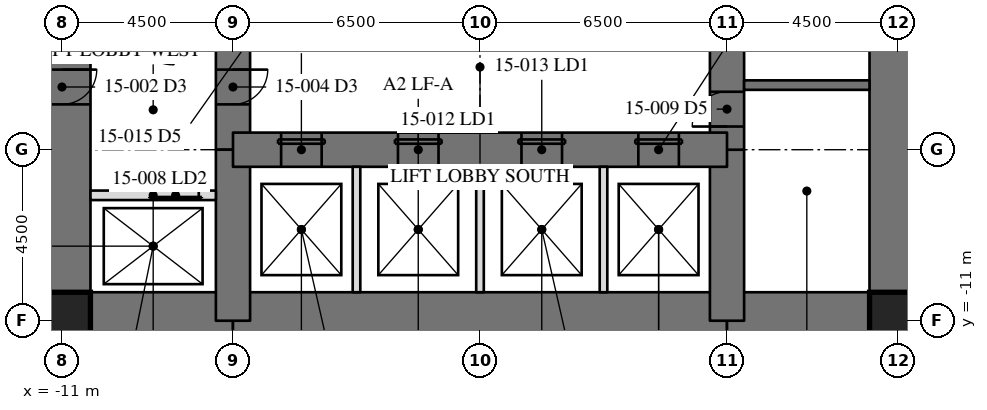
"""IFC4 building model, lengths in metres.
Left out: names, types, materials, properties, quantities, classifications, styles, units other than length and angle.
Written with IfcOpenShell. Run it as: python <this file> out.ifc"""

import sys

from ifc_helpers import new_model, si_unit, direction, frame, frame_2d, origin, origin_2d, place, context, subcontext, project, spatial, rectangle, hollow_rectangle, extrude, element, fill, save


model = new_model("IFC4")
c1 = context("Model", 3, precision=1e-05, world=origin(), true_north=direction((0.0, 1.0)))
c2 = subcontext(c1, "Body", "Model", "MODEL_VIEW")
j1 = project(units=[si_unit("LENGTHUNIT", "METRE"), si_unit("PLANEANGLEUNIT", "RADIAN")], contexts=[c1])
p1 = place(None, origin())
s1 = spatial("IfcSite", under=j1, at=p1, CompositionType="ELEMENT")
p2 = place(p1, origin())
s2 = spatial("IfcBuilding", under=s1, at=p2, CompositionType="ELEMENT")
p3 = place(p2, frame((0.0, 0.0, 65.2)))
s3 = spatial("IfcBuildingStorey", under=s2, at=p3, CompositionType="ELEMENT", Elevation=65.2)
p4 = place(p3, frame((11.0, -11.0, 0.0), z_axis=(0.0, 0.0, 1.0), x_axis=(0.0, 1.0, 0.0)))
e1 = element("IfcWall", 1, at=p4, inside=s3, PredefinedType="SHEAR", context=c2, shape_type="SweptSolid", body=[
    extrude(rectangle(XDim=22.0, YDim=1.5, at=frame_2d((11.0, 0.0))), origin(), (0.0, 0.0, 1.0), 4.1),
])
p5 = place(p4, frame((15.393, 0.0, 0.0)))
e2 = element("IfcOpeningElement", 2, at=p5, cuts=e1, PredefinedType="OPENING", context=c2, shape_type="SweptSolid", body=[
    extrude(rectangle(XDim=0.915, YDim=2.134, at=frame_2d((0.458, 1.067))), frame((0.0, 0.76, 0.0), z_axis=(0.0, -1.0, 0.0), x_axis=(1.0, 0.0, 0.0)), (0.0, 0.0, 1.0), 1.52),
])
p6 = place(p3, frame((-11.0, 11.0, 0.0), z_axis=(0.0, 0.0, 1.0), x_axis=(0.0, -1.0, 0.0)))
e3 = element("IfcWall", 3, at=p6, inside=s3, PredefinedType="SHEAR", context=c2, shape_type="SweptSolid", body=[
    extrude(rectangle(XDim=22.0, YDim=1.5, at=frame_2d((11.0, 0.0))), origin(), (0.0, 0.0, 1.0), 4.1),
])
p7 = place(p6, frame((15.393, 0.0, 0.0)))
e4 = element("IfcOpeningElement", 4, at=p7, cuts=e3, PredefinedType="OPENING", context=c2, shape_type="SweptSolid", body=[
    extrude(rectangle(XDim=0.915, YDim=2.134, at=frame_2d((0.458, 1.067))), frame((0.0, 0.76, 0.0), z_axis=(0.0, -1.0, 0.0), x_axis=(1.0, 0.0, 0.0)), (0.0, 0.0, 1.0), 1.52),
])
p8 = place(p3, frame((-11.0, -11.0, 0.0), z_axis=(0.0, 0.0, 1.0), x_axis=(1.0, 0.0, 0.0)))
e5 = element("IfcWall", 5, at=p8, inside=s3, PredefinedType="SHEAR", context=c2, shape_type="SweptSolid", body=[
    extrude(rectangle(XDim=4.5, YDim=1.5, at=frame_2d((2.25, 0.0))), origin(), (0.0, 0.0, 1.0), 4.1),
])
p9 = place(p3, frame((-6.5, -11.0, 0.0), z_axis=(0.0, 0.0, 1.0), x_axis=(1.0, 0.0, 0.0)))
e6 = element("IfcWall", 6, at=p9, inside=s3, PredefinedType="SHEAR", context=c2, shape_type="SweptSolid", body=[
    extrude(rectangle(XDim=13.0, YDim=1.5, at=frame_2d((6.5, 0.0))), origin(), (0.0, 0.0, 1.0), 4.1),
])
p10 = place(p3, frame((6.5, -11.0, 0.0), z_axis=(0.0, 0.0, 1.0), x_axis=(1.0, 0.0, 0.0)))
e7 = element("IfcWall", 7, at=p10, inside=s3, PredefinedType="SHEAR", context=c2, shape_type="SweptSolid", body=[
    extrude(rectangle(XDim=4.5, YDim=1.5, at=frame_2d((2.25, 0.0))), origin(), (0.0, 0.0, 1.0), 4.1),
])
p11 = place(p3, frame((6.5, -11.0, 0.0), z_axis=(0.0, 0.0, 1.0), x_axis=(0.0, 1.0, 0.0)))
e8 = element("IfcWall", 8, at=p11, inside=s3, PredefinedType="SHEAR", context=c2, shape_type="SweptSolid", body=[
    extrude(rectangle(XDim=4.5, YDim=0.9, at=frame_2d((2.25, 0.0))), origin(), (0.0, 0.0, 1.0), 4.1),
])
p12 = place(p3, frame((6.5, -6.5, 0.0), z_axis=(0.0, 0.0, 1.0), x_axis=(0.0, 1.0, 0.0)))
e9 = element("IfcWall", 9, at=p12, inside=s3, PredefinedType="SHEAR", context=c2, shape_type="SweptSolid", body=[
    extrude(rectangle(XDim=13.0, YDim=0.9, at=frame_2d((6.5, 0.0))), origin(), (0.0, 0.0, 1.0), 4.1),
])
p13 = place(p12, frame((10.893, 0.0, 0.0)))
e10 = element("IfcOpeningElement", 10, at=p13, cuts=e9, PredefinedType="OPENING", context=c2, shape_type="SweptSolid", body=[
    extrude(rectangle(XDim=0.915, YDim=2.134, at=frame_2d((0.458, 1.067))), frame((0.0, 0.46, 0.0), z_axis=(0.0, -1.0, 0.0), x_axis=(1.0, 0.0, 0.0)), (0.0, 0.0, 1.0), 0.92),
])
p14 = place(p12, frame((0.61, 0.0, 0.0)))
e11 = element("IfcOpeningElement", 11, at=p14, cuts=e9, PredefinedType="OPENING", context=c2, shape_type="SweptSolid", body=[
    extrude(rectangle(XDim=0.915, YDim=2.134, at=frame_2d((0.458, 1.067))), frame((0.0, 0.46, 0.0), z_axis=(0.0, -1.0, 0.0), x_axis=(1.0, 0.0, 0.0)), (0.0, 0.0, 1.0), 0.92),
])
p15 = place(p3, frame((-6.5, 6.5, 0.0), z_axis=(0.0, 0.0, 1.0), x_axis=(0.0, -1.0, 0.0)))
e12 = element("IfcWall", 12, at=p15, inside=s3, PredefinedType="SHEAR", context=c2, shape_type="SweptSolid", body=[
    extrude(rectangle(XDim=13.0, YDim=0.9, at=frame_2d((6.5, 0.0))), origin(), (0.0, 0.0, 1.0), 4.1),
])
p16 = place(p15, frame((10.893, 0.0, 0.0)))
e13 = element("IfcOpeningElement", 13, at=p16, cuts=e12, PredefinedType="OPENING", context=c2, shape_type="SweptSolid", body=[
    extrude(rectangle(XDim=0.915, YDim=2.134, at=frame_2d((0.458, 1.067))), frame((0.0, 0.46, 0.0), z_axis=(0.0, -1.0, 0.0), x_axis=(1.0, 0.0, 0.0)), (0.0, 0.0, 1.0), 0.92),
])
p17 = place(p15, frame((0.61, 0.0, 0.0)))
e14 = element("IfcOpeningElement", 14, at=p17, cuts=e12, PredefinedType="OPENING", context=c2, shape_type="SweptSolid", body=[
    extrude(rectangle(XDim=0.915, YDim=2.134, at=frame_2d((0.458, 1.067))), frame((0.0, 0.46, 0.0), z_axis=(0.0, -1.0, 0.0), x_axis=(1.0, 0.0, 0.0)), (0.0, 0.0, 1.0), 0.92),
])
p18 = place(p3, frame((-6.5, -6.5, 0.0), z_axis=(0.0, 0.0, 1.0), x_axis=(0.0, -1.0, 0.0)))
e15 = element("IfcWall", 15, at=p18, inside=s3, PredefinedType="SHEAR", context=c2, shape_type="SweptSolid", body=[
    extrude(rectangle(XDim=4.5, YDim=0.9, at=frame_2d((2.25, 0.0))), origin(), (0.0, 0.0, 1.0), 4.1),
])
p19 = place(p3, frame((-6.5, -6.5, 0.0), z_axis=(0.0, 0.0, 1.0), x_axis=(1.0, 0.0, 0.0)))
e16 = element("IfcWall", 16, at=p19, inside=s3, PredefinedType="SHEAR", context=c2, shape_type="SweptSolid", body=[
    extrude(rectangle(XDim=13.0, YDim=0.9, at=frame_2d((6.5, 0.0))), origin(), (0.0, 0.0, 1.0), 4.1),
])
p20 = place(p19, frame((1.267, 0.0, 0.0)))
e17 = element("IfcOpeningElement", 17, at=p20, cuts=e16, PredefinedType="OPENING", context=c2, shape_type="SweptSolid", body=[
    extrude(rectangle(XDim=1.067, YDim=2.134, at=frame_2d((0.533, 1.067))), frame((0.0, 0.46, 0.0), z_axis=(0.0, -1.0, 0.0), x_axis=(1.0, 0.0, 0.0)), (0.0, 0.0, 1.0), 0.92),
])
p21 = place(p19, frame((4.342, 0.0, 0.0)))
e18 = element("IfcOpeningElement", 18, at=p21, cuts=e16, PredefinedType="OPENING", context=c2, shape_type="SweptSolid", body=[
    extrude(rectangle(XDim=1.067, YDim=2.134, at=frame_2d((0.533, 1.067))), frame((0.0, 0.46, 0.0), z_axis=(0.0, -1.0, 0.0), x_axis=(1.0, 0.0, 0.0)), (0.0, 0.0, 1.0), 0.92),
])
p22 = place(p19, frame((7.592, 0.0, 0.0)))
e19 = element("IfcOpeningElement", 19, at=p22, cuts=e16, PredefinedType="OPENING", context=c2, shape_type="SweptSolid", body=[
    extrude(rectangle(XDim=1.067, YDim=2.134, at=frame_2d((0.533, 1.067))), frame((0.0, 0.46, 0.0), z_axis=(0.0, -1.0, 0.0), x_axis=(1.0, 0.0, 0.0)), (0.0, 0.0, 1.0), 0.92),
])
p23 = place(p19, frame((10.667, 0.0, 0.0)))
e20 = element("IfcOpeningElement", 20, at=p23, cuts=e16, PredefinedType="OPENING", context=c2, shape_type="SweptSolid", body=[
    extrude(rectangle(XDim=1.067, YDim=2.134, at=frame_2d((0.533, 1.067))), frame((0.0, 0.46, 0.0), z_axis=(0.0, -1.0, 0.0), x_axis=(1.0, 0.0, 0.0)), (0.0, 0.0, 1.0), 0.92),
])
for number, where, z_axis, x_axis in (
    (21, (-11.0, -11.0, 0.0), (0.0, 0.0, 1.0), (1.0, 0.0, 0.0)),
    (22, (11.0, -11.0, 0.0), (0.0, 0.0, 1.0), (1.0, 0.0, 0.0)),
):
    element("IfcColumn", number, at=place(p3, frame(where, z_axis=z_axis, x_axis=x_axis)), inside=s3, PredefinedType="COLUMN", context=c2, shape_type="SweptSolid", body=[
        extrude(hollow_rectangle(XDim=1.499, YDim=1.499, WallThickness=0.102, at=origin_2d()), origin(), (0.0, 0.0, 1.0), 4.1),
    ])
p24 = place(p3, frame((6.95, -4.8, 0.0), z_axis=(0.0, 0.0, 1.0), x_axis=(1.0, 0.0, 0.0)))
e23 = element("IfcWall", 23, at=p24, inside=s3, PredefinedType="SOLIDWALL", context=c2, shape_type="SweptSolid", body=[
    extrude(rectangle(XDim=3.3, YDim=0.25, at=frame_2d((1.65, 0.0))), origin(), (0.0, 0.0, 1.0), 3.91),
])
p25 = place(p3, frame((-6.95, -7.7, 0.0), z_axis=(0.0, 0.0, 1.0), x_axis=(-1.0, 0.0, 0.0)))
e24 = element("IfcWall", 24, at=p25, inside=s3, PredefinedType="PARTITIONING", context=c2, shape_type="SweptSolid", body=[
    extrude(rectangle(XDim=3.3, YDim=0.25, at=frame_2d((1.65, 0.0))), origin(), (0.0, 0.0, 1.0), 3.91),
])
p26 = place(p25, frame((0.45, 0.0, 0.0)))
e25 = element("IfcOpeningElement", 25, at=p26, cuts=e24, PredefinedType="OPENING", context=c2, shape_type="SweptSolid", body=[
    extrude(rectangle(XDim=1.219, YDim=2.134, at=frame_2d((0.609, 1.067))), frame((0.0, 0.135, 0.0), z_axis=(0.0, -1.0, 0.0), x_axis=(1.0, 0.0, 0.0)), (0.0, 0.0, 1.0), 0.27),
])
for number, where, z_axis, x_axis in (
    (26, (-3.25, -10.25, 0.0), (0.0, 0.0, 1.0), (0.0, 1.0, 0.0)),
    (27, (0.0, -10.25, 0.0), (0.0, 0.0, 1.0), (0.0, 1.0, 0.0)),
    (28, (3.25, -10.25, 0.0), (0.0, 0.0, 1.0), (0.0, 1.0, 0.0)),
):
    element("IfcWall", number, at=place(p3, frame(where, z_axis=z_axis, x_axis=x_axis)), inside=s3, PredefinedType="PARTITIONING", context=c2, shape_type="SweptSolid", body=[
        extrude(rectangle(XDim=3.3, YDim=0.2, at=frame_2d((1.65, 0.0))), origin(), (0.0, 0.0, 1.0), 3.91),
    ])
p27 = place(p16, origin())
e29 = element("IfcDoor", 29, at=p27, inside=s3, OperationType="SINGLE_SWING_RIGHT", PredefinedType="DOOR", context=c2, shape_type="SweptSolid", body=[
    extrude(rectangle(XDim=0.915, YDim=2.134, at=frame_2d((0.458, 1.067))), frame((0.0, -0.375, 0.0), z_axis=(0.0, -1.0, 0.0), x_axis=(1.0, 0.0, 0.0)), (0.0, 0.0, 1.0), 0.05),
])
fill(e13, e29)
p28 = place(p26, origin())
e30 = element("IfcDoor", 30, at=p28, inside=s3, OperationType="SLIDING_TO_LEFT", PredefinedType="DOOR", context=c2, shape_type="SweptSolid", body=[
    extrude(rectangle(XDim=1.219, YDim=2.134, at=frame_2d((0.609, 1.067))), frame((0.0, 0.025, 0.0), z_axis=(0.0, -1.0, 0.0), x_axis=(1.0, 0.0, 0.0)), (0.0, 0.0, 1.0), 0.05),
])
fill(e25, e30)
p29 = place(p14, origin())
e31 = element("IfcDoor", 31, at=p29, inside=s3, OperationType="SINGLE_SWING_RIGHT", PredefinedType="DOOR", context=c2, shape_type="SweptSolid", body=[
    extrude(rectangle(XDim=0.915, YDim=2.134, at=frame_2d((0.458, 1.067))), frame((0.0, -0.375, 0.0), z_axis=(0.0, -1.0, 0.0), x_axis=(1.0, 0.0, 0.0)), (0.0, 0.0, 1.0), 0.05),
])
fill(e11, e31)
p30 = place(p20, origin())
e32 = element("IfcDoor", 32, at=p30, inside=s3, OperationType="SLIDING_TO_LEFT", PredefinedType="DOOR", context=c2, shape_type="SweptSolid", body=[
    extrude(rectangle(XDim=1.067, YDim=2.134, at=frame_2d((0.533, 1.067))), frame((0.0, -0.375, 0.0), z_axis=(0.0, -1.0, 0.0), x_axis=(1.0, 0.0, 0.0)), (0.0, 0.0, 1.0), 0.05),
])
fill(e17, e32)
p31 = place(p21, origin())
e33 = element("IfcDoor", 33, at=p31, inside=s3, OperationType="SLIDING_TO_LEFT", PredefinedType="DOOR", context=c2, shape_type="SweptSolid", body=[
    extrude(rectangle(XDim=1.067, YDim=2.134, at=frame_2d((0.533, 1.067))), frame((0.0, -0.375, 0.0), z_axis=(0.0, -1.0, 0.0), x_axis=(1.0, 0.0, 0.0)), (0.0, 0.0, 1.0), 0.05),
])
fill(e18, e33)
p32 = place(p22, origin())
e34 = element("IfcDoor", 34, at=p32, inside=s3, OperationType="SLIDING_TO_LEFT", PredefinedType="DOOR", context=c2, shape_type="SweptSolid", body=[
    extrude(rectangle(XDim=1.067, YDim=2.134, at=frame_2d((0.533, 1.067))), frame((0.0, -0.375, 0.0), z_axis=(0.0, -1.0, 0.0), x_axis=(1.0, 0.0, 0.0)), (0.0, 0.0, 1.0), 0.05),
])
fill(e19, e34)
p33 = place(p23, origin())
e35 = element("IfcDoor", 35, at=p33, inside=s3, OperationType="SLIDING_TO_LEFT", PredefinedType="DOOR", context=c2, shape_type="SweptSolid", body=[
    extrude(rectangle(XDim=1.067, YDim=2.134, at=frame_2d((0.533, 1.067))), frame((0.0, -0.375, 0.0), z_axis=(0.0, -1.0, 0.0), x_axis=(1.0, 0.0, 0.0)), (0.0, 0.0, 1.0), 0.05),
])
fill(e20, e35)
save(model, sys.argv[1])
